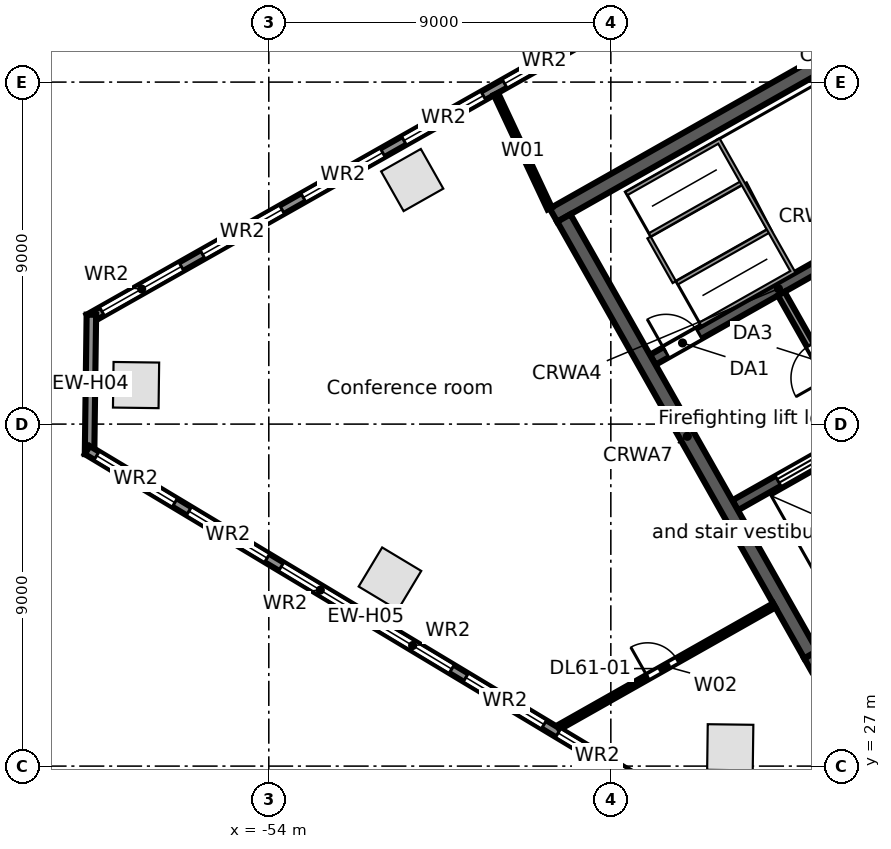
"""IFC4 building model, lengths in metres.
Left out: names, types, materials, properties, quantities, classifications, styles, units other than length and angle.
Written with IfcOpenShell. Run it as: python <this file> out.ifc"""

import sys

from ifc_helpers import new_model, si_unit, direction, frame, frame_2d, origin, origin_2d, place, context, subcontext, project, spatial, rectangle, extrude, element, fill, save


model = new_model("IFC4")
c1 = context("Model", 3, precision=1e-05, world=origin(), true_north=direction((0.0, 1.0)))
c2 = subcontext(c1, "Body", "Model", "MODEL_VIEW")
j1 = project(units=[si_unit("LENGTHUNIT", "METRE"), si_unit("PLANEANGLEUNIT", "RADIAN")], contexts=[c1])
p1 = place(None, origin())
s1 = spatial("IfcSite", under=j1, at=p1, CompositionType="ELEMENT")
p2 = place(p1, origin())
s2 = spatial("IfcBuilding", under=s1, at=p2, CompositionType="ELEMENT")
p3 = place(p2, frame((0.0, 0.0, 277.9)))
s3 = spatial("IfcBuildingStorey", under=s2, at=p3, CompositionType="ELEMENT", Elevation=277.9)
for number, where, z_axis, x_axis in (
    (1, (-50.226, 42.423, 0.0), (0.0, 0.0, 1.0), (-0.87, -0.492, 0.0)),
    (2, (-57.493, 37.027, 0.0), (0.0, 0.0, 1.0), (-0.013, -1.0, 0.0)),
    (3, (-50.812, 31.931, 0.0), (0.0, 0.0, 1.0), (0.857, -0.515, 0.0)),
    (4, (-41.858, 27.495, 0.0), (0.0, 0.0, 1.0), (1.0, -0.013, 0.0)),
):
    element("IfcColumn", number, at=place(p3, frame(where, z_axis=z_axis, x_axis=x_axis)), inside=s3, PredefinedType="COLUMN", context=c2, shape_type="SweptSolid", body=[
        extrude(rectangle(XDim=1.2, YDim=1.2, at=origin_2d()), origin(), (0.0, 0.0, 1.0), 3.8),
    ])
p4 = place(p3, frame((-58.732, 38.771, 0.0), z_axis=(0.0, 0.0, 1.0), x_axis=(0.870355615581, 0.492423702137, 0.0)))
e5 = element("IfcWall", 5, at=p4, inside=s3, PredefinedType="STANDARD", context=c2, shape_type="SweptSolid", body=[
    extrude(rectangle(XDim=64.052, YDim=0.25, at=frame_2d((32.026, 0.0))), origin(), (0.0, 0.0, 1.0), 3.52),
])
p5 = place(p4, frame((61.259, 0.0, 0.8)))
e6 = element("IfcOpeningElement", 6, at=p5, cuts=e5, PredefinedType="OPENING", context=c2, shape_type="SweptSolid", body=[
    extrude(rectangle(XDim=2.4, YDim=2.2, at=frame_2d((1.2, 1.1))), frame((0.0, 0.135, 0.0), z_axis=(0.0, -1.0, 0.0), x_axis=(1.0, 0.0, 0.0)), (0.0, 0.0, 1.0), 0.27),
])
p6 = place(p4, frame((58.216, 0.0, 0.8)))
e7 = element("IfcOpeningElement", 7, at=p6, cuts=e5, PredefinedType="OPENING", context=c2, shape_type="SweptSolid", body=[
    extrude(rectangle(XDim=2.4, YDim=2.2, at=frame_2d((1.2, 1.1))), frame((0.0, 0.135, 0.0), z_axis=(0.0, -1.0, 0.0), x_axis=(1.0, 0.0, 0.0)), (0.0, 0.0, 1.0), 0.27),
])
p7 = place(p4, frame((55.173, 0.0, 0.8)))
e8 = element("IfcOpeningElement", 8, at=p7, cuts=e5, PredefinedType="OPENING", context=c2, shape_type="SweptSolid", body=[
    extrude(rectangle(XDim=2.4, YDim=2.2, at=frame_2d((1.2, 1.1))), frame((0.0, 0.135, 0.0), z_axis=(0.0, -1.0, 0.0), x_axis=(1.0, 0.0, 0.0)), (0.0, 0.0, 1.0), 0.27),
])
p8 = place(p4, frame((52.129, 0.0, 0.8)))
e9 = element("IfcOpeningElement", 9, at=p8, cuts=e5, PredefinedType="OPENING", context=c2, shape_type="SweptSolid", body=[
    extrude(rectangle(XDim=2.4, YDim=2.2, at=frame_2d((1.2, 1.1))), frame((0.0, 0.135, 0.0), z_axis=(0.0, -1.0, 0.0), x_axis=(1.0, 0.0, 0.0)), (0.0, 0.0, 1.0), 0.27),
])
p9 = place(p4, frame((49.086, 0.0, 0.8)))
e10 = element("IfcOpeningElement", 10, at=p9, cuts=e5, PredefinedType="OPENING", context=c2, shape_type="SweptSolid", body=[
    extrude(rectangle(XDim=2.4, YDim=2.2, at=frame_2d((1.2, 1.1))), frame((0.0, 0.135, 0.0), z_axis=(0.0, -1.0, 0.0), x_axis=(1.0, 0.0, 0.0)), (0.0, 0.0, 1.0), 0.27),
])
p10 = place(p4, frame((46.043, 0.0, 0.8)))
e11 = element("IfcOpeningElement", 11, at=p10, cuts=e5, PredefinedType="OPENING", context=c2, shape_type="SweptSolid", body=[
    extrude(rectangle(XDim=2.4, YDim=2.2, at=frame_2d((1.2, 1.1))), frame((0.0, 0.135, 0.0), z_axis=(0.0, -1.0, 0.0), x_axis=(1.0, 0.0, 0.0)), (0.0, 0.0, 1.0), 0.27),
])
p11 = place(p4, frame((43.0, 0.0, 0.8)))
e12 = element("IfcOpeningElement", 12, at=p11, cuts=e5, PredefinedType="OPENING", context=c2, shape_type="SweptSolid", body=[
    extrude(rectangle(XDim=2.4, YDim=2.2, at=frame_2d((1.2, 1.1))), frame((0.0, 0.135, 0.0), z_axis=(0.0, -1.0, 0.0), x_axis=(1.0, 0.0, 0.0)), (0.0, 0.0, 1.0), 0.27),
])
p12 = place(p4, frame((39.956, 0.0, 0.8)))
e13 = element("IfcOpeningElement", 13, at=p12, cuts=e5, PredefinedType="OPENING", context=c2, shape_type="SweptSolid", body=[
    extrude(rectangle(XDim=2.4, YDim=2.2, at=frame_2d((1.2, 1.1))), frame((0.0, 0.135, 0.0), z_axis=(0.0, -1.0, 0.0), x_axis=(1.0, 0.0, 0.0)), (0.0, 0.0, 1.0), 0.27),
])
p13 = place(p4, frame((36.913, 0.0, 0.8)))
e14 = element("IfcOpeningElement", 14, at=p13, cuts=e5, PredefinedType="OPENING", context=c2, shape_type="SweptSolid", body=[
    extrude(rectangle(XDim=2.4, YDim=2.2, at=frame_2d((1.2, 1.1))), frame((0.0, 0.135, 0.0), z_axis=(0.0, -1.0, 0.0), x_axis=(1.0, 0.0, 0.0)), (0.0, 0.0, 1.0), 0.27),
])
p14 = place(p4, frame((33.87, 0.0, 0.8)))
e15 = element("IfcOpeningElement", 15, at=p14, cuts=e5, PredefinedType="OPENING", context=c2, shape_type="SweptSolid", body=[
    extrude(rectangle(XDim=2.4, YDim=2.2, at=frame_2d((1.2, 1.1))), frame((0.0, 0.135, 0.0), z_axis=(0.0, -1.0, 0.0), x_axis=(1.0, 0.0, 0.0)), (0.0, 0.0, 1.0), 0.27),
])
p15 = place(p4, frame((30.826, 0.0, 0.8)))
e16 = element("IfcOpeningElement", 16, at=p15, cuts=e5, PredefinedType="OPENING", context=c2, shape_type="SweptSolid", body=[
    extrude(rectangle(XDim=2.4, YDim=2.2, at=frame_2d((1.2, 1.1))), frame((0.0, 0.135, 0.0), z_axis=(0.0, -1.0, 0.0), x_axis=(1.0, 0.0, 0.0)), (0.0, 0.0, 1.0), 0.27),
])
p16 = place(p4, frame((27.783, 0.0, 0.8)))
e17 = element("IfcOpeningElement", 17, at=p16, cuts=e5, PredefinedType="OPENING", context=c2, shape_type="SweptSolid", body=[
    extrude(rectangle(XDim=2.4, YDim=2.2, at=frame_2d((1.2, 1.1))), frame((0.0, 0.135, 0.0), z_axis=(0.0, -1.0, 0.0), x_axis=(1.0, 0.0, 0.0)), (0.0, 0.0, 1.0), 0.27),
])
p17 = place(p4, frame((24.74, 0.0, 0.8)))
e18 = element("IfcOpeningElement", 18, at=p17, cuts=e5, PredefinedType="OPENING", context=c2, shape_type="SweptSolid", body=[
    extrude(rectangle(XDim=2.4, YDim=2.2, at=frame_2d((1.2, 1.1))), frame((0.0, 0.135, 0.0), z_axis=(0.0, -1.0, 0.0), x_axis=(1.0, 0.0, 0.0)), (0.0, 0.0, 1.0), 0.27),
])
p18 = place(p4, frame((21.696, 0.0, 0.8)))
e19 = element("IfcOpeningElement", 19, at=p18, cuts=e5, PredefinedType="OPENING", context=c2, shape_type="SweptSolid", body=[
    extrude(rectangle(XDim=2.4, YDim=2.2, at=frame_2d((1.2, 1.1))), frame((0.0, 0.135, 0.0), z_axis=(0.0, -1.0, 0.0), x_axis=(1.0, 0.0, 0.0)), (0.0, 0.0, 1.0), 0.27),
])
p19 = place(p4, frame((18.653, 0.0, 0.8)))
e20 = element("IfcOpeningElement", 20, at=p19, cuts=e5, PredefinedType="OPENING", context=c2, shape_type="SweptSolid", body=[
    extrude(rectangle(XDim=2.4, YDim=2.2, at=frame_2d((1.2, 1.1))), frame((0.0, 0.135, 0.0), z_axis=(0.0, -1.0, 0.0), x_axis=(1.0, 0.0, 0.0)), (0.0, 0.0, 1.0), 0.27),
])
p20 = place(p4, frame((15.61, 0.0, 0.8)))
e21 = element("IfcOpeningElement", 21, at=p20, cuts=e5, PredefinedType="OPENING", context=c2, shape_type="SweptSolid", body=[
    extrude(rectangle(XDim=2.4, YDim=2.2, at=frame_2d((1.2, 1.1))), frame((0.0, 0.135, 0.0), z_axis=(0.0, -1.0, 0.0), x_axis=(1.0, 0.0, 0.0)), (0.0, 0.0, 1.0), 0.27),
])
p21 = place(p4, frame((12.567, 0.0, 0.8)))
e22 = element("IfcOpeningElement", 22, at=p21, cuts=e5, PredefinedType="OPENING", context=c2, shape_type="SweptSolid", body=[
    extrude(rectangle(XDim=2.4, YDim=2.2, at=frame_2d((1.2, 1.1))), frame((0.0, 0.135, 0.0), z_axis=(0.0, -1.0, 0.0), x_axis=(1.0, 0.0, 0.0)), (0.0, 0.0, 1.0), 0.27),
])
p22 = place(p4, frame((9.523, 0.0, 0.8)))
e23 = element("IfcOpeningElement", 23, at=p22, cuts=e5, PredefinedType="OPENING", context=c2, shape_type="SweptSolid", body=[
    extrude(rectangle(XDim=2.4, YDim=2.2, at=frame_2d((1.2, 1.1))), frame((0.0, 0.135, 0.0), z_axis=(0.0, -1.0, 0.0), x_axis=(1.0, 0.0, 0.0)), (0.0, 0.0, 1.0), 0.27),
])
p23 = place(p4, frame((6.48, 0.0, 0.8)))
e24 = element("IfcOpeningElement", 24, at=p23, cuts=e5, PredefinedType="OPENING", context=c2, shape_type="SweptSolid", body=[
    extrude(rectangle(XDim=2.4, YDim=2.2, at=frame_2d((1.2, 1.1))), frame((0.0, 0.135, 0.0), z_axis=(0.0, -1.0, 0.0), x_axis=(1.0, 0.0, 0.0)), (0.0, 0.0, 1.0), 0.27),
])
p24 = place(p4, frame((3.437, 0.0, 0.8)))
e25 = element("IfcOpeningElement", 25, at=p24, cuts=e5, PredefinedType="OPENING", context=c2, shape_type="SweptSolid", body=[
    extrude(rectangle(XDim=2.4, YDim=2.2, at=frame_2d((1.2, 1.1))), frame((0.0, 0.135, 0.0), z_axis=(0.0, -1.0, 0.0), x_axis=(1.0, 0.0, 0.0)), (0.0, 0.0, 1.0), 0.27),
])
p25 = place(p4, frame((0.393, 0.0, 0.8)))
e26 = element("IfcOpeningElement", 26, at=p25, cuts=e5, PredefinedType="OPENING", context=c2, shape_type="SweptSolid", body=[
    extrude(rectangle(XDim=2.4, YDim=2.2, at=frame_2d((1.2, 1.1))), frame((0.0, 0.135, 0.0), z_axis=(0.0, -1.0, 0.0), x_axis=(1.0, 0.0, 0.0)), (0.0, 0.0, 1.0), 0.27),
])
p26 = place(p3, frame((-58.717, 35.208, 0.0), z_axis=(0.0, 0.0, 1.0), x_axis=(0.01310512158, 0.999914124207, 0.0)))
e27 = element("IfcWall", 27, at=p26, inside=s3, PredefinedType="STANDARD", context=c2, shape_type="SweptSolid", body=[
    extrude(rectangle(XDim=3.67, YDim=0.25, at=frame_2d((1.835, 0.0))), origin(), (0.0, 0.0, 1.0), 3.52),
])
p27 = place(p3, frame((-44.115, 26.507, 0.0), z_axis=(0.0, 0.0, 1.0), x_axis=(-0.857166583633, 0.515039268311, 0.0)))
e28 = element("IfcWall", 28, at=p27, inside=s3, PredefinedType="STANDARD", context=c2, shape_type="SweptSolid", body=[
    extrude(rectangle(XDim=17.106, YDim=0.25, at=frame_2d((8.553, 0.0))), origin(), (0.0, 0.0, 1.0), 3.52),
])
p28 = place(p27, frame((14.417, 0.0, 0.8)))
e29 = element("IfcOpeningElement", 29, at=p28, cuts=e28, PredefinedType="OPENING", context=c2, shape_type="SweptSolid", body=[
    extrude(rectangle(XDim=2.4, YDim=2.2, at=frame_2d((1.2, 1.1))), frame((0.0, 0.135, 0.0), z_axis=(0.0, -1.0, 0.0), x_axis=(1.0, 0.0, 0.0)), (0.0, 0.0, 1.0), 0.27),
])
p29 = place(p27, frame((11.584, 0.0, 0.8)))
e30 = element("IfcOpeningElement", 30, at=p29, cuts=e28, PredefinedType="OPENING", context=c2, shape_type="SweptSolid", body=[
    extrude(rectangle(XDim=2.4, YDim=2.2, at=frame_2d((1.2, 1.1))), frame((0.0, 0.135, 0.0), z_axis=(0.0, -1.0, 0.0), x_axis=(1.0, 0.0, 0.0)), (0.0, 0.0, 1.0), 0.27),
])
p30 = place(p27, frame((8.75, 0.0, 0.8)))
e31 = element("IfcOpeningElement", 31, at=p30, cuts=e28, PredefinedType="OPENING", context=c2, shape_type="SweptSolid", body=[
    extrude(rectangle(XDim=2.4, YDim=2.2, at=frame_2d((1.2, 1.1))), frame((0.0, 0.135, 0.0), z_axis=(0.0, -1.0, 0.0), x_axis=(1.0, 0.0, 0.0)), (0.0, 0.0, 1.0), 0.27),
])
p31 = place(p27, frame((5.917, 0.0, 0.8)))
e32 = element("IfcOpeningElement", 32, at=p31, cuts=e28, PredefinedType="OPENING", context=c2, shape_type="SweptSolid", body=[
    extrude(rectangle(XDim=2.4, YDim=2.2, at=frame_2d((1.2, 1.1))), frame((0.0, 0.135, 0.0), z_axis=(0.0, -1.0, 0.0), x_axis=(1.0, 0.0, 0.0)), (0.0, 0.0, 1.0), 0.27),
])
p32 = place(p27, frame((3.084, 0.0, 0.8)))
e33 = element("IfcOpeningElement", 33, at=p32, cuts=e28, PredefinedType="OPENING", context=c2, shape_type="SweptSolid", body=[
    extrude(rectangle(XDim=2.4, YDim=2.2, at=frame_2d((1.2, 1.1))), frame((0.0, 0.135, 0.0), z_axis=(0.0, -1.0, 0.0), x_axis=(1.0, 0.0, 0.0)), (0.0, 0.0, 1.0), 0.27),
])
p33 = place(p27, frame((0.25, 0.0, 0.8)))
e34 = element("IfcOpeningElement", 34, at=p33, cuts=e28, PredefinedType="OPENING", context=c2, shape_type="SweptSolid", body=[
    extrude(rectangle(XDim=2.4, YDim=2.2, at=frame_2d((1.2, 1.1))), frame((0.0, 0.135, 0.0), z_axis=(0.0, -1.0, 0.0), x_axis=(1.0, 0.0, 0.0)), (0.0, 0.0, 1.0), 0.27),
])
p34 = place(p3, frame((-39.813, 29.662, 0.0), z_axis=(0.0, 0.0, 1.0), x_axis=(0.870350116061, 0.492433422375, 0.0)))
e35 = element("IfcWall", 35, at=p34, inside=s3, PredefinedType="SOLIDWALL", context=c2, shape_type="SweptSolid", body=[
    extrude(rectangle(XDim=17.0, YDim=0.4, at=frame_2d((8.5, 0.0))), origin(), (0.0, 0.0, 1.0), 3.52),
])
p35 = place(p34, frame((7.2, 0.0, 0.0)))
e36 = element("IfcOpeningElement", 36, at=p35, cuts=e35, PredefinedType="OPENING", context=c2, shape_type="SweptSolid", body=[
    extrude(rectangle(XDim=1.2, YDim=2.1, at=frame_2d((0.6, 1.05))), frame((0.0, 0.21, 0.0), z_axis=(0.0, -1.0, 0.0), x_axis=(1.0, 0.0, 0.0)), (0.0, 0.0, 1.0), 0.42),
])
p36 = place(p3, frame((-41.73, 33.863, 0.0), z_axis=(0.0, 0.0, 1.0), x_axis=(0.870350800578, 0.492432212525, 0.0)))
e37 = element("IfcWall", 37, at=p36, inside=s3, PredefinedType="SOLIDWALL", context=c2, shape_type="SweptSolid", body=[
    extrude(rectangle(XDim=6.2, YDim=0.3, at=frame_2d((3.1, 0.0))), origin(), (0.0, 0.0, 1.0), 3.52),
])
p37 = place(p36, frame((1.3, 0.0, 0.0)))
e38 = element("IfcOpeningElement", 38, at=p37, cuts=e37, PredefinedType="OPENING", context=c2, shape_type="SweptSolid", body=[
    extrude(rectangle(XDim=1.1, YDim=2.1, at=frame_2d((0.55, 1.05))), frame((0.0, 0.16, 0.0), z_axis=(0.0, -1.0, 0.0), x_axis=(1.0, 0.0, 0.0)), (0.0, 0.0, 1.0), 0.32),
])
p38 = place(p36, frame((4.15, 0.0, 0.0)))
e39 = element("IfcOpeningElement", 39, at=p38, cuts=e37, PredefinedType="OPENING", context=c2, shape_type="SweptSolid", body=[
    extrude(rectangle(XDim=0.9, YDim=2.1, at=frame_2d((0.45, 1.05))), frame((0.0, 0.16, 0.0), z_axis=(0.0, -1.0, 0.0), x_axis=(1.0, 0.0, 0.0)), (0.0, 0.0, 1.0), 0.32),
])
p39 = place(p3, frame((-43.897, 37.692, 0.0), z_axis=(0.0, 0.0, 1.0), x_axis=(0.870356351998, 0.492422400523, 0.0)))
e40 = element("IfcWall", 40, at=p39, inside=s3, PredefinedType="SOLIDWALL", context=c2, shape_type="SweptSolid", body=[
    extrude(rectangle(XDim=7.6, YDim=0.3, at=frame_2d((3.8, 0.0))), origin(), (0.0, 0.0, 1.0), 3.52),
])
p40 = place(p39, frame((0.4, 0.0, 0.0)))
e41 = element("IfcOpeningElement", 41, at=p40, cuts=e40, PredefinedType="OPENING", context=c2, shape_type="SweptSolid", body=[
    extrude(rectangle(XDim=1.0, YDim=2.1, at=frame_2d((0.5, 1.05))), frame((0.0, 0.16, 0.0), z_axis=(0.0, -1.0, 0.0), x_axis=(1.0, 0.0, 0.0)), (0.0, 0.0, 1.0), 0.32),
])
p41 = place(p3, frame((-46.51, 41.499, 0.0), z_axis=(0.0, 0.0, 1.0), x_axis=(0.870356271124, 0.492422543467, 0.0)))
e42 = element("IfcWall", 42, at=p41, inside=s3, PredefinedType="SOLIDWALL", context=c2, shape_type="SweptSolid", body=[
    extrude(rectangle(XDim=17.0, YDim=0.4, at=frame_2d((8.5, 0.0))), origin(), (0.0, 0.0, 1.0), 3.52),
])
p42 = place(p3, frame((-46.238, 41.423, 0.0), z_axis=(0.0, 0.0, 1.0), x_axis=(0.492421663121, -0.870356769198, 0.0)))
e43 = element("IfcWall", 43, at=p42, inside=s3, PredefinedType="SOLIDWALL", context=c2, shape_type="SweptSolid", body=[
    extrude(rectangle(XDim=13.2, YDim=0.4, at=frame_2d((6.6, 0.0))), origin(), (0.0, 0.0, 1.0), 3.52),
])
p43 = place(p3, frame((-40.516, 39.433, 0.0), z_axis=(0.0, 0.0, 1.0), x_axis=(0.492453559952, -0.87033872216, 0.0)))
e44 = element("IfcWall", 44, at=p43, inside=s3, PredefinedType="PARTITIONING", context=c2, shape_type="SweptSolid", body=[
    extrude(rectangle(XDim=4.1, YDim=0.2, at=frame_2d((2.05, 0.0))), origin(), (0.0, 0.0, 1.0), 3.52),
])
p44 = place(p43, frame((1.55, 0.0, 0.0)))
e45 = element("IfcOpeningElement", 45, at=p44, cuts=e44, PredefinedType="OPENING", context=c2, shape_type="SweptSolid", body=[
    extrude(rectangle(XDim=1.0, YDim=2.1, at=frame_2d((0.5, 1.05))), frame((0.0, 0.11, 0.0), z_axis=(0.0, -1.0, 0.0), x_axis=(1.0, 0.0, 0.0)), (0.0, 0.0, 1.0), 0.22),
])
p45 = place(p3, frame((-48.022, 44.687, 0.0), z_axis=(0.0, 0.0, 1.0), x_axis=(0.424510917438, -0.905422818895, 0.0)))
e46 = element("IfcWall", 46, at=p45, inside=s3, PredefinedType="PARTITIONING", context=c2, shape_type="SweptSolid", body=[
    extrude(rectangle(XDim=3.329, YDim=0.125, at=frame_2d((1.665, 0.0))), origin(), (0.0, 0.0, 1.0), 2.888),
])
p46 = place(p3, frame((-46.381, 28.015, 0.0), z_axis=(0.0, 0.0, 1.0), x_axis=(0.870364232693, 0.492408471139, 0.0)))
e47 = element("IfcWall", 47, at=p46, inside=s3, PredefinedType="PARTITIONING", context=c2, shape_type="SweptSolid", body=[
    extrude(rectangle(XDim=6.527, YDim=0.125, at=frame_2d((3.264, 0.0))), origin(), (0.0, 0.0, 1.0), 2.8),
])
p47 = place(p46, frame((2.7, 0.0, 0.0)))
e48 = element("IfcOpeningElement", 48, at=p47, cuts=e47, PredefinedType="OPENING", context=c2, shape_type="SweptSolid", body=[
    extrude(rectangle(XDim=0.9, YDim=2.1, at=frame_2d((0.45, 1.05))), frame((0.0, 0.073, 0.0), z_axis=(0.0, -1.0, 0.0), x_axis=(1.0, 0.0, 0.0)), (0.0, 0.0, 1.0), 0.145),
])
p48 = place(p21, origin())
e49 = element("IfcWindow", 49, at=p48, inside=s3, PartitioningType="SINGLE_PANEL", PredefinedType="WINDOW", context=c2, shape_type="SweptSolid", body=[
    extrude(rectangle(XDim=2.4, YDim=2.2, at=frame_2d((1.2, 1.1))), frame((0.0, 0.03, 0.0), z_axis=(0.0, -1.0, 0.0), x_axis=(1.0, 0.0, 0.0)), (0.0, 0.0, 1.0), 0.06),
])
fill(e22, e49)
p49 = place(p22, origin())
e50 = element("IfcWindow", 50, at=p49, inside=s3, PartitioningType="SINGLE_PANEL", PredefinedType="WINDOW", context=c2, shape_type="SweptSolid", body=[
    extrude(rectangle(XDim=2.4, YDim=2.2, at=frame_2d((1.2, 1.1))), frame((0.0, 0.03, 0.0), z_axis=(0.0, -1.0, 0.0), x_axis=(1.0, 0.0, 0.0)), (0.0, 0.0, 1.0), 0.06),
])
fill(e23, e50)
p50 = place(p23, origin())
e51 = element("IfcWindow", 51, at=p50, inside=s3, PartitioningType="SINGLE_PANEL", PredefinedType="WINDOW", context=c2, shape_type="SweptSolid", body=[
    extrude(rectangle(XDim=2.4, YDim=2.2, at=frame_2d((1.2, 1.1))), frame((0.0, 0.03, 0.0), z_axis=(0.0, -1.0, 0.0), x_axis=(1.0, 0.0, 0.0)), (0.0, 0.0, 1.0), 0.06),
])
fill(e24, e51)
p51 = place(p24, origin())
e52 = element("IfcWindow", 52, at=p51, inside=s3, PartitioningType="SINGLE_PANEL", PredefinedType="WINDOW", context=c2, shape_type="SweptSolid", body=[
    extrude(rectangle(XDim=2.4, YDim=2.2, at=frame_2d((1.2, 1.1))), frame((0.0, 0.03, 0.0), z_axis=(0.0, -1.0, 0.0), x_axis=(1.0, 0.0, 0.0)), (0.0, 0.0, 1.0), 0.06),
])
fill(e25, e52)
p52 = place(p25, origin())
e53 = element("IfcWindow", 53, at=p52, inside=s3, PartitioningType="SINGLE_PANEL", PredefinedType="WINDOW", context=c2, shape_type="SweptSolid", body=[
    extrude(rectangle(XDim=2.4, YDim=2.2, at=frame_2d((1.2, 1.1))), frame((0.0, 0.03, 0.0), z_axis=(0.0, -1.0, 0.0), x_axis=(1.0, 0.0, 0.0)), (0.0, 0.0, 1.0), 0.06),
])
fill(e26, e53)
p53 = place(p28, origin())
e54 = element("IfcWindow", 54, at=p53, inside=s3, PartitioningType="SINGLE_PANEL", PredefinedType="WINDOW", context=c2, shape_type="SweptSolid", body=[
    extrude(rectangle(XDim=2.4, YDim=2.2, at=frame_2d((1.2, 1.1))), frame((0.0, 0.03, 0.0), z_axis=(0.0, -1.0, 0.0), x_axis=(1.0, 0.0, 0.0)), (0.0, 0.0, 1.0), 0.06),
])
fill(e29, e54)
p54 = place(p29, origin())
e55 = element("IfcWindow", 55, at=p54, inside=s3, PartitioningType="SINGLE_PANEL", PredefinedType="WINDOW", context=c2, shape_type="SweptSolid", body=[
    extrude(rectangle(XDim=2.4, YDim=2.2, at=frame_2d((1.2, 1.1))), frame((0.0, 0.03, 0.0), z_axis=(0.0, -1.0, 0.0), x_axis=(1.0, 0.0, 0.0)), (0.0, 0.0, 1.0), 0.06),
])
fill(e30, e55)
p55 = place(p30, origin())
e56 = element("IfcWindow", 56, at=p55, inside=s3, PartitioningType="SINGLE_PANEL", PredefinedType="WINDOW", context=c2, shape_type="SweptSolid", body=[
    extrude(rectangle(XDim=2.4, YDim=2.2, at=frame_2d((1.2, 1.1))), frame((0.0, 0.03, 0.0), z_axis=(0.0, -1.0, 0.0), x_axis=(1.0, 0.0, 0.0)), (0.0, 0.0, 1.0), 0.06),
])
fill(e31, e56)
p56 = place(p31, origin())
e57 = element("IfcWindow", 57, at=p56, inside=s3, PartitioningType="SINGLE_PANEL", PredefinedType="WINDOW", context=c2, shape_type="SweptSolid", body=[
    extrude(rectangle(XDim=2.4, YDim=2.2, at=frame_2d((1.2, 1.1))), frame((0.0, 0.03, 0.0), z_axis=(0.0, -1.0, 0.0), x_axis=(1.0, 0.0, 0.0)), (0.0, 0.0, 1.0), 0.06),
])
fill(e32, e57)
p57 = place(p32, origin())
e58 = element("IfcWindow", 58, at=p57, inside=s3, PartitioningType="SINGLE_PANEL", PredefinedType="WINDOW", context=c2, shape_type="SweptSolid", body=[
    extrude(rectangle(XDim=2.4, YDim=2.2, at=frame_2d((1.2, 1.1))), frame((0.0, 0.03, 0.0), z_axis=(0.0, -1.0, 0.0), x_axis=(1.0, 0.0, 0.0)), (0.0, 0.0, 1.0), 0.06),
])
fill(e33, e58)
p58 = place(p33, origin())
e59 = element("IfcWindow", 59, at=p58, inside=s3, PartitioningType="SINGLE_PANEL", PredefinedType="WINDOW", context=c2, shape_type="SweptSolid", body=[
    extrude(rectangle(XDim=2.4, YDim=2.2, at=frame_2d((1.2, 1.1))), frame((0.0, 0.03, 0.0), z_axis=(0.0, -1.0, 0.0), x_axis=(1.0, 0.0, 0.0)), (0.0, 0.0, 1.0), 0.06),
])
fill(e34, e59)
p59 = place(p37, origin())
e60 = element("IfcDoor", 60, at=p59, inside=s3, OperationType="DOUBLE_DOOR_SLIDING", PredefinedType="DOOR", context=c2, shape_type="SweptSolid", body=[
    extrude(rectangle(XDim=1.1, YDim=2.1, at=frame_2d((0.55, 1.05))), frame((0.0, 0.025, 0.0), z_axis=(0.0, -1.0, 0.0), x_axis=(1.0, 0.0, 0.0)), (0.0, 0.0, 1.0), 0.05),
])
fill(e38, e60)
p60 = place(p40, origin())
e61 = element("IfcDoor", 61, at=p60, inside=s3, OperationType="SINGLE_SWING_LEFT", PredefinedType="DOOR", context=c2, shape_type="SweptSolid", body=[
    extrude(rectangle(XDim=1.0, YDim=2.1, at=frame_2d((0.5, 1.05))), frame((0.0, 0.025, 0.0), z_axis=(0.0, -1.0, 0.0), x_axis=(1.0, 0.0, 0.0)), (0.0, 0.0, 1.0), 0.05),
])
fill(e41, e61)
p61 = place(p44, frame((1.0, 0.0, 0.0), z_axis=(0.0, 0.0, 1.0), x_axis=(-1.0, 0.0, 0.0)))
e62 = element("IfcDoor", 62, at=p61, inside=s3, OperationType="SINGLE_SWING_LEFT", PredefinedType="DOOR", context=c2, shape_type="SweptSolid", body=[
    extrude(rectangle(XDim=1.0, YDim=2.1, at=frame_2d((0.5, 1.05))), frame((0.0, 0.025, 0.0), z_axis=(0.0, -1.0, 0.0), x_axis=(1.0, 0.0, 0.0)), (0.0, 0.0, 1.0), 0.05),
])
fill(e45, e62)
p62 = place(p47, origin())
e63 = element("IfcDoor", 63, at=p62, inside=s3, OperationType="SINGLE_SWING_LEFT", PredefinedType="DOOR", context=c2, shape_type="SweptSolid", body=[
    extrude(rectangle(XDim=0.9, YDim=2.1, at=frame_2d((0.45, 1.05))), frame((0.0, 0.025, 0.0), z_axis=(0.0, -1.0, 0.0), x_axis=(1.0, 0.0, 0.0)), (0.0, 0.0, 1.0), 0.05),
])
fill(e48, e63)
save(model, sys.argv[1])
